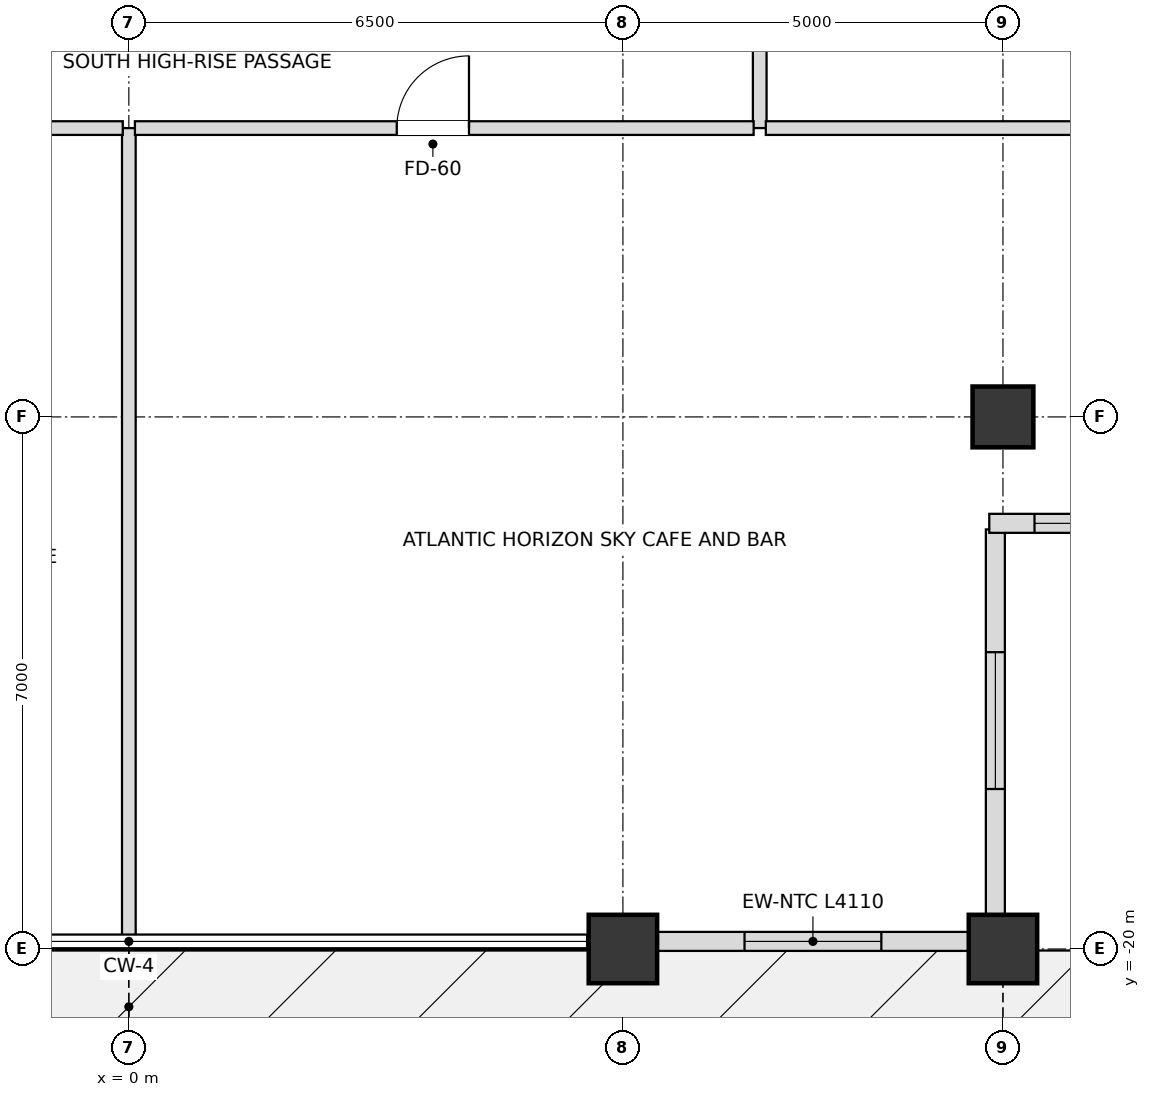
"""IFC4 building model, lengths in metres.
Left out: names, types, materials, properties, quantities, classifications, styles, units other than length and angle.
Written with IfcOpenShell. Run it as: python <this file> out.ifc"""

import sys

from ifc_helpers import new_model, si_unit, direction, frame, frame_2d, origin, origin_2d, place, context, subcontext, project, spatial, rectangle, extrude, element, fill, save


model = new_model("IFC4")
c1 = context("Model", 3, precision=1e-05, world=origin(), true_north=direction((0.0, 1.0)))
c2 = subcontext(c1, "Body", "Model", "MODEL_VIEW")
j1 = project(units=[si_unit("LENGTHUNIT", "METRE"), si_unit("PLANEANGLEUNIT", "RADIAN")], contexts=[c1])
p1 = place(None, origin())
s1 = spatial("IfcSite", under=j1, at=p1, CompositionType="ELEMENT")
p2 = place(p1, origin())
s2 = spatial("IfcBuilding", under=s1, at=p2, CompositionType="ELEMENT")
p3 = place(p2, frame((0.0, 0.0, 217.8)))
s3 = spatial("IfcBuildingStorey", under=s2, at=p3, CompositionType="ELEMENT", Elevation=217.8)
for number, where, z_axis, x_axis in (
    (1, (6.5, -20.0, 0.0), (0.0, 0.0, 1.0), (1.0, 0.0, 0.0)),
    (2, (11.5, -20.0, 0.0), (0.0, 0.0, 1.0), (1.0, 0.0, 0.0)),
):
    element("IfcColumn", number, at=place(p3, frame(where, z_axis=z_axis, x_axis=x_axis)), inside=s3, PredefinedType="USERDEFINED", context=c2, shape_type="SweptSolid", body=[
        extrude(rectangle(XDim=0.9, YDim=0.9, at=origin_2d()), origin(), (0.0, 0.0, 1.0), 4.5),
    ])
p4 = place(p3, frame((11.5, -13.0, 0.0), z_axis=(0.0, 0.0, 1.0), x_axis=(1.0, 0.0, 0.0)))
e3 = element("IfcColumn", 3, at=p4, inside=s3, PredefinedType="COLUMN", context=c2, shape_type="SweptSolid", body=[
    extrude(rectangle(XDim=0.8, YDim=0.8, at=origin_2d()), origin(), (0.0, 0.0, 1.0), 4.5),
])
p5 = place(p3, frame((6.945, -19.9, 0.0), z_axis=(0.0, 0.0, 1.0), x_axis=(1.0, 0.0, 0.0)))
e4 = element("IfcWall", 4, at=p5, inside=s3, PredefinedType="SOLIDWALL", context=c2, shape_type="SweptSolid", body=[
    extrude(rectangle(XDim=4.11, YDim=0.25, at=frame_2d((2.055, 0.0))), origin(), (0.0, 0.0, 1.0), 3.648),
])
p6 = place(p5, frame((1.155, 0.0, 0.72)))
e5 = element("IfcOpeningElement", 5, at=p6, cuts=e4, PredefinedType="OPENING", context=c2, shape_type="SweptSolid", body=[
    extrude(rectangle(XDim=1.8, YDim=1.68, at=frame_2d((0.9, 0.84))), frame((0.0, 0.135, 0.0), z_axis=(0.0, -1.0, 0.0), x_axis=(1.0, 0.0, 0.0)), (0.0, 0.0, 1.0), 0.27),
])
p7 = place(p3, frame((11.4, -19.82, 0.0), z_axis=(0.0, 0.0, 1.0), x_axis=(0.0, 1.0, 0.0)))
e6 = element("IfcWall", 6, at=p7, inside=s3, PredefinedType="SOLIDWALL", context=c2, shape_type="SweptSolid", body=[
    extrude(rectangle(XDim=5.34, YDim=0.25, at=frame_2d((2.67, 0.0))), origin(), (0.0, 0.0, 1.0), 3.648),
])
p8 = place(p7, frame((1.925, 0.0, 0.72)))
e7 = element("IfcOpeningElement", 7, at=p8, cuts=e6, PredefinedType="OPENING", context=c2, shape_type="SweptSolid", body=[
    extrude(rectangle(XDim=1.8, YDim=1.68, at=frame_2d((0.9, 0.84))), frame((0.0, 0.135, 0.0), z_axis=(0.0, -1.0, 0.0), x_axis=(1.0, 0.0, 0.0)), (0.0, 0.0, 1.0), 0.27),
])
p9 = place(p3, frame((11.32, -14.4, 0.0), z_axis=(0.0, 0.0, 1.0), x_axis=(1.0, 0.0, 0.0)))
e8 = element("IfcWall", 8, at=p9, inside=s3, PredefinedType="SOLIDWALL", context=c2, shape_type="SweptSolid", body=[
    extrude(rectangle(XDim=5.66, YDim=0.25, at=frame_2d((2.83, 0.0))), origin(), (0.0, 0.0, 1.0), 3.648),
])
p10 = place(p9, frame((0.595, 0.0, 0.72)))
e9 = element("IfcOpeningElement", 9, at=p10, cuts=e8, PredefinedType="OPENING", context=c2, shape_type="SweptSolid", body=[
    extrude(rectangle(XDim=1.8, YDim=1.68, at=frame_2d((0.9, 0.84))), frame((0.0, 0.135, 0.0), z_axis=(0.0, -1.0, 0.0), x_axis=(1.0, 0.0, 0.0)), (0.0, 0.0, 1.0), 0.27),
])
p11 = place(p9, frame((3.265, 0.0, 0.72)))
e10 = element("IfcOpeningElement", 10, at=p11, cuts=e8, PredefinedType="OPENING", context=c2, shape_type="SweptSolid", body=[
    extrude(rectangle(XDim=1.8, YDim=1.68, at=frame_2d((0.9, 0.84))), frame((0.0, 0.135, 0.0), z_axis=(0.0, -1.0, 0.0), x_axis=(1.0, 0.0, 0.0)), (0.0, 0.0, 1.0), 0.27),
])
p12 = place(p3, frame((0.0, -19.9, 0.0), z_axis=(0.0, 0.0, 1.0), x_axis=(0.0, 1.0, 0.0)))
e11 = element("IfcWall", 11, at=p12, inside=s3, PredefinedType="PARTITIONING", context=c2, shape_type="SweptSolid", body=[
    extrude(rectangle(XDim=10.7, YDim=0.18, at=frame_2d((5.35, 0.0))), origin(), (0.0, 0.0, 1.0), 3.918),
])
p13 = place(p3, frame((8.3, -9.2, 0.0), z_axis=(0.0, 0.0, 1.0), x_axis=(0.0, 1.0, 0.0)))
e12 = element("IfcWall", 12, at=p13, inside=s3, PredefinedType="PARTITIONING", context=c2, shape_type="SweptSolid", body=[
    extrude(rectangle(XDim=5.4, YDim=0.18, at=frame_2d((2.7, 0.0))), origin(), (0.0, 0.0, 1.0), 3.726),
])
p14 = place(p13, frame((3.125, 0.0, 0.0)))
e13 = element("IfcOpeningElement", 13, at=p14, cuts=e12, PredefinedType="OPENING", context=c2, shape_type="SweptSolid", body=[
    extrude(rectangle(XDim=0.95, YDim=2.15, at=frame_2d((0.475, 1.075))), frame((0.0, 0.1, 0.0), z_axis=(0.0, -1.0, 0.0), x_axis=(1.0, 0.0, 0.0)), (0.0, 0.0, 1.0), 0.2),
])
p15 = place(p3, frame((-6.42, -9.2, 0.0), z_axis=(0.0, 0.0, 1.0), x_axis=(1.0, 0.0, 0.0)))
e14 = element("IfcWall", 14, at=p15, inside=s3, PredefinedType="PARTITIONING", context=c2, shape_type="SweptSolid", body=[
    extrude(rectangle(XDim=6.34, YDim=0.18, at=frame_2d((3.17, 0.0))), origin(), (0.0, 0.0, 1.0), 4.28),
])
p16 = place(p15, frame((2.745, 0.0, 0.0)))
e15 = element("IfcOpeningElement", 15, at=p16, cuts=e14, PredefinedType="OPENING", context=c2, shape_type="SweptSolid", body=[
    extrude(rectangle(XDim=0.95, YDim=2.15, at=frame_2d((0.475, 1.075))), frame((0.0, 0.1, 0.0), z_axis=(0.0, -1.0, 0.0), x_axis=(1.0, 0.0, 0.0)), (0.0, 0.0, 1.0), 0.2),
])
p17 = place(p3, frame((0.08, -9.2, 0.0), z_axis=(0.0, 0.0, 1.0), x_axis=(1.0, 0.0, 0.0)))
e16 = element("IfcWall", 16, at=p17, inside=s3, PredefinedType="PARTITIONING", context=c2, shape_type="SweptSolid", body=[
    extrude(rectangle(XDim=8.14, YDim=0.18, at=frame_2d((4.07, 0.0))), origin(), (0.0, 0.0, 1.0), 3.726),
])
p18 = place(p17, frame((3.445, 0.0, 0.0)))
e17 = element("IfcOpeningElement", 17, at=p18, cuts=e16, PredefinedType="OPENING", context=c2, shape_type="SweptSolid", body=[
    extrude(rectangle(XDim=0.95, YDim=2.15, at=frame_2d((0.475, 1.075))), frame((0.0, 0.1, 0.0), z_axis=(0.0, -1.0, 0.0), x_axis=(1.0, 0.0, 0.0)), (0.0, 0.0, 1.0), 0.2),
])
p19 = place(p3, frame((8.38, -9.2, 0.0), z_axis=(0.0, 0.0, 1.0), x_axis=(1.0, 0.0, 0.0)))
e18 = element("IfcWall", 18, at=p19, inside=s3, PredefinedType="PARTITIONING", context=c2, shape_type="SweptSolid", body=[
    extrude(rectangle(XDim=8.44, YDim=0.18, at=frame_2d((4.22, 0.0))), origin(), (0.0, 0.0, 1.0), 4.28),
])
p20 = place(p6, origin())
e19 = element("IfcWindow", 19, at=p20, inside=s3, PartitioningType="SINGLE_PANEL", PredefinedType="WINDOW", context=c2, shape_type="SweptSolid", body=[
    extrude(rectangle(XDim=1.8, YDim=1.68, at=frame_2d((0.9, 0.84))), frame((0.0, 0.03, 0.0), z_axis=(0.0, -1.0, 0.0), x_axis=(1.0, 0.0, 0.0)), (0.0, 0.0, 1.0), 0.06),
])
fill(e5, e19)
p21 = place(p8, origin())
e20 = element("IfcWindow", 20, at=p21, inside=s3, PartitioningType="SINGLE_PANEL", PredefinedType="WINDOW", context=c2, shape_type="SweptSolid", body=[
    extrude(rectangle(XDim=1.8, YDim=1.68, at=frame_2d((0.9, 0.84))), frame((0.0, 0.03, 0.0), z_axis=(0.0, -1.0, 0.0), x_axis=(1.0, 0.0, 0.0)), (0.0, 0.0, 1.0), 0.06),
])
fill(e7, e20)
p22 = place(p10, origin())
e21 = element("IfcWindow", 21, at=p22, inside=s3, PartitioningType="SINGLE_PANEL", PredefinedType="WINDOW", context=c2, shape_type="SweptSolid", body=[
    extrude(rectangle(XDim=1.8, YDim=1.68, at=frame_2d((0.9, 0.84))), frame((0.0, 0.03, 0.0), z_axis=(0.0, -1.0, 0.0), x_axis=(1.0, 0.0, 0.0)), (0.0, 0.0, 1.0), 0.06),
])
fill(e9, e21)
p23 = place(p18, origin())
e22 = element("IfcDoor", 22, at=p23, inside=s3, OperationType="SINGLE_SWING_RIGHT", PredefinedType="DOOR", context=c2, shape_type="SweptSolid", body=[
    extrude(rectangle(XDim=0.95, YDim=2.15, at=frame_2d((0.475, 1.075))), frame((0.0, 0.025, 0.0), z_axis=(0.0, -1.0, 0.0), x_axis=(1.0, 0.0, 0.0)), (0.0, 0.0, 1.0), 0.05),
])
fill(e17, e22)
save(model, sys.argv[1])
